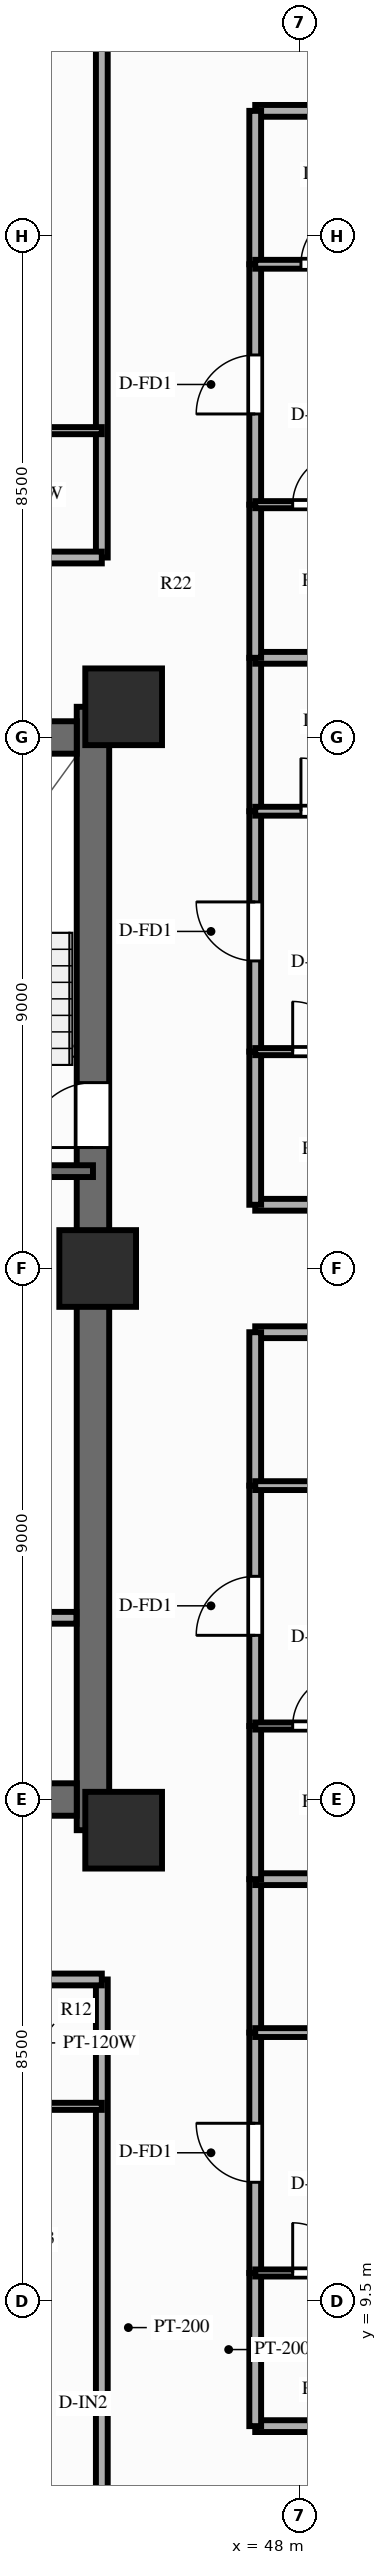
"""IFC4 building model, lengths in metres.
Left out: names, types, materials, properties, quantities, classifications, styles, units other than length and angle.
Written with IfcOpenShell. Run it as: python <this file> out.ifc"""

import sys

from ifc_helpers import new_model, si_unit, direction, frame, frame_2d, origin, origin_2d, place, context, subcontext, project, spatial, rectangle, extrude, source, transform, mapped, element, fill, save


model = new_model("IFC4")
c1 = context("Model", 3, precision=1e-05, world=origin(), true_north=direction((0.0, 1.0)))
c2 = subcontext(c1, "Body", "Model", "MODEL_VIEW")
j1 = project(units=[si_unit("LENGTHUNIT", "METRE"), si_unit("PLANEANGLEUNIT", "RADIAN")], contexts=[c1])
p1 = place(None, origin())
s1 = spatial("IfcSite", under=j1, at=p1, CompositionType="ELEMENT")
p2 = place(p1, origin())
s2 = spatial("IfcBuilding", under=s1, at=p2, CompositionType="ELEMENT")
p3 = place(p2, frame((0.0, 0.0, 104.85)))
s3 = spatial("IfcBuildingStorey", under=s2, at=p3, CompositionType="ELEMENT", Elevation=104.85)
p4 = place(p3, frame((44.5, 17.48, 0.0), z_axis=(0.0, 0.0, 1.0), x_axis=(0.0, 1.0, 0.0)))
e1 = element("IfcWall", 1, at=p4, inside=s3, PredefinedType="SHEAR", context=c2, shape_type="SweptSolid", body=[
    extrude(rectangle(XDim=19.04, YDim=0.55, at=frame_2d((9.52, 0.0))), origin(), (0.0, 0.0, 1.0), 3.0),
])
p5 = place(p4, frame((12.67, 0.0, 0.0), z_axis=(0.0, 0.0, 1.0), x_axis=(-1.0, 0.0, 0.0)))
e2 = element("IfcOpeningElement", 2, at=p5, cuts=e1, PredefinedType="OPENING", context=c2, shape_type="SweptSolid", body=[
    extrude(rectangle(XDim=1.1, YDim=2.15, at=frame_2d((0.55, 1.075))), frame((0.0, 0.287, 0.0), z_axis=(0.0, -1.0, 0.0), x_axis=(1.0, 0.0, 0.0)), (0.0, 0.0, 1.0), 0.574),
])
p6 = place(p3, frame((31.775, 18.0, 0.0), z_axis=(0.0, 0.0, 1.0), x_axis=(1.0, 0.0, 0.0)))
e3 = element("IfcWall", 3, at=p6, inside=s3, PredefinedType="SHEAR", context=c2, shape_type="SweptSolid", body=[
    extrude(rectangle(XDim=12.45, YDim=0.55, at=frame_2d((6.225, 0.0))), origin(), (0.0, 0.0, 1.0), 3.0),
])
p7 = place(p3, frame((31.775, 36.0, 0.0), z_axis=(0.0, 0.0, 1.0), x_axis=(1.0, 0.0, 0.0)))
e4 = element("IfcWall", 4, at=p7, inside=s3, PredefinedType="SHEAR", context=c2, shape_type="SweptSolid", body=[
    extrude(rectangle(XDim=12.45, YDim=0.55, at=frame_2d((6.225, 0.0))), origin(), (0.0, 0.0, 1.0), 3.0),
])
p8 = place(p7, frame((5.175, 0.0, 0.0), z_axis=(0.0, 0.0, 1.0), x_axis=(-1.0, 0.0, 0.0)))
e5 = element("IfcOpeningElement", 5, at=p8, cuts=e4, PredefinedType="OPENING", context=c2, shape_type="SweptSolid", body=[
    extrude(rectangle(XDim=1.4, YDim=2.15, at=frame_2d((0.7, 1.075))), frame((0.0, 0.287, 0.0), z_axis=(0.0, -1.0, 0.0), x_axis=(1.0, 0.0, 0.0)), (0.0, 0.0, 1.0), 0.574),
])
m1 = source(origin(), c2, "Body", "SweptSolid", [
    extrude(rectangle(XDim=1.3, YDim=1.3, at=origin_2d()), origin(), (0.0, 0.0, 1.0), 3.0),
])
for number, where, z_axis, x_axis in (
    (6, (45.02, 17.48, 0.0), (0.0, 0.0, 1.0), (1.0, 0.0, 0.0)),
    (7, (45.02, 36.52, 0.0), (0.0, 0.0, 1.0), (1.0, 0.0, 0.0)),
    (8, (44.58, 27.0, 0.0), (0.0, 0.0, 1.0), (1.0, 0.0, 0.0)),
):
    element("IfcColumn", number, at=place(p3, frame(where, z_axis=z_axis, x_axis=x_axis)), inside=s3, PredefinedType="COLUMN", context=c2, shape_type="MappedRepresentation", body=[
        mapped(m1, transform((0.0, 0.0, 0.0), scale=1.0)),
    ])
p9 = place(p3, frame((42.88, 21.08, 0.0), z_axis=(0.0, 0.0, 1.0), x_axis=(1.0, 0.0, 0.0)))
e9 = element("IfcWall", 9, at=p9, inside=s3, PredefinedType="PARTITIONING", context=c2, shape_type="SweptSolid", body=[
    extrude(rectangle(XDim=1.34, YDim=0.2, at=frame_2d((0.67, 0.0))), origin(), (0.0, 0.0, 1.0), 2.79),
])
p10 = place(p3, frame((40.57, 28.65, 0.0), z_axis=(0.0, 0.0, 1.0), x_axis=(1.0, 0.0, 0.0)))
e10 = element("IfcWall", 10, at=p10, inside=s3, PredefinedType="SOLIDWALL", context=c2, shape_type="SweptSolid", body=[
    extrude(rectangle(XDim=3.93, YDim=0.2, at=frame_2d((1.965, 0.0))), origin(), (0.0, 0.0, 1.0), 2.79),
])
p11 = place(p3, frame((44.65, 14.95, 0.0), z_axis=(0.0, 0.0, 1.0), x_axis=(0.0, -1.0, 0.0)))
e11 = element("IfcWall", 11, at=p11, inside=s3, PredefinedType="PARTITIONING", context=c2, shape_type="SweptSolid", body=[
    extrude(rectangle(XDim=11.8, YDim=0.2, at=frame_2d((5.9, 0.0))), origin(), (0.0, 0.0, 1.0), 2.34),
])
p12 = place(p3, frame((42.5, 14.95, 0.0), z_axis=(0.0, 0.0, 1.0), x_axis=(1.0, 0.0, 0.0)))
e12 = element("IfcWall", 12, at=p12, inside=s3, PredefinedType="PARTITIONING", context=c2, shape_type="SweptSolid", body=[
    extrude(rectangle(XDim=2.15, YDim=0.2, at=frame_2d((1.075, 0.0))), origin(), (0.0, 0.0, 1.0), 2.79),
])
p13 = place(p3, frame((42.5, 12.8, 0.0), z_axis=(0.0, 0.0, 1.0), x_axis=(1.0, 0.0, 0.0)))
e13 = element("IfcWall", 13, at=p13, inside=s3, PredefinedType="PARTITIONING", context=c2, shape_type="SweptSolid", body=[
    extrude(rectangle(XDim=2.15, YDim=0.12, at=frame_2d((1.075, 0.0))), origin(), (0.0, 0.0, 1.0), 2.79),
])
p14 = place(p3, frame((44.65, 39.05, 0.0), z_axis=(0.0, 0.0, 1.0), x_axis=(0.0, 1.0, 0.0)))
e14 = element("IfcWall", 14, at=p14, inside=s3, PredefinedType="PARTITIONING", context=c2, shape_type="SweptSolid", body=[
    extrude(rectangle(XDim=11.8, YDim=0.2, at=frame_2d((5.9, 0.0))), origin(), (0.0, 0.0, 1.0), 2.34),
])
p15 = place(p3, frame((42.085, 39.05, 0.0), z_axis=(0.0, 0.0, 1.0), x_axis=(1.0, 0.0, 0.0)))
e15 = element("IfcWall", 15, at=p15, inside=s3, PredefinedType="PARTITIONING", context=c2, shape_type="SweptSolid", body=[
    extrude(rectangle(XDim=2.564, YDim=0.2, at=frame_2d((1.282, 0.0))), origin(), (0.0, 0.0, 1.0), 2.79),
])
p16 = place(p3, frame((42.085, 41.2, 0.0), z_axis=(0.0, 0.0, 1.0), x_axis=(1.0, 0.0, 0.0)))
e16 = element("IfcWall", 16, at=p16, inside=s3, PredefinedType="PARTITIONING", context=c2, shape_type="SweptSolid", body=[
    extrude(rectangle(XDim=2.564, YDim=0.12, at=frame_2d((1.282, 0.0))), origin(), (0.0, 0.0, 1.0), 2.79),
])
for number, where, z_axis, x_axis in (
    (17, (47.25, 7.38, 0.0), (0.0, 0.0, 1.0), (1.0, 0.0, 0.0)),
    (18, (47.25, 25.92, 0.0), (0.0, 0.0, 1.0), (1.0, 0.0, 0.0)),
):
    element("IfcWall", number, at=place(p3, frame(where, z_axis=z_axis, x_axis=x_axis)), inside=s3, PredefinedType="PARTITIONING", context=c2, shape_type="SweptSolid", body=[
        extrude(rectangle(XDim=16.6, YDim=0.2, at=frame_2d((8.3, 0.0))), origin(), (0.0, 0.0, 1.0), 2.79),
    ])
p17 = place(p3, frame((47.25, 7.38, 0.0), z_axis=(0.0, 0.0, 1.0), x_axis=(0.0, 1.0, 0.0)))
e19 = element("IfcWall", 19, at=p17, inside=s3, PredefinedType="PARTITIONING", context=c2, shape_type="SweptSolid", body=[
    extrude(rectangle(XDim=2.596, YDim=0.2, at=frame_2d((1.298, 0.0))), origin(), (0.0, 0.0, 1.0), 2.79),
])
p18 = place(p3, frame((47.25, 9.976, 0.0), z_axis=(0.0, 0.0, 1.0), x_axis=(0.0, 1.0, 0.0)))
e20 = element("IfcWall", 20, at=p18, inside=s3, PredefinedType="PARTITIONING", context=c2, shape_type="SweptSolid", body=[
    extrude(rectangle(XDim=4.074, YDim=0.2, at=frame_2d((2.037, 0.0))), origin(), (0.0, 0.0, 1.0), 2.79),
])
p19 = place(p18, frame((1.537, 0.0, 0.0)))
e21 = element("IfcOpeningElement", 21, at=p19, cuts=e20, PredefinedType="OPENING", context=c2, shape_type="SweptSolid", body=[
    extrude(rectangle(XDim=1.0, YDim=2.15, at=frame_2d((0.5, 1.075))), frame((0.0, 0.112, 0.0), z_axis=(0.0, -1.0, 0.0), x_axis=(1.0, 0.0, 0.0)), (0.0, 0.0, 1.0), 0.224),
])
p20 = place(p3, frame((47.25, 14.05, 0.0), z_axis=(0.0, 0.0, 1.0), x_axis=(0.0, 1.0, 0.0)))
e22 = element("IfcWall", 22, at=p20, inside=s3, PredefinedType="PARTITIONING", context=c2, shape_type="SweptSolid", body=[
    extrude(rectangle(XDim=2.6, YDim=0.2, at=frame_2d((1.3, 0.0))), origin(), (0.0, 0.0, 1.0), 2.79),
])
p21 = place(p3, frame((47.25, 9.976, 0.0), z_axis=(0.0, 0.0, 1.0), x_axis=(1.0, 0.0, 0.0)))
e23 = element("IfcWall", 23, at=p21, inside=s3, PredefinedType="PARTITIONING", context=c2, shape_type="SweptSolid", body=[
    extrude(rectangle(XDim=2.12, YDim=0.12, at=frame_2d((1.06, 0.0))), origin(), (0.0, 0.0, 1.0), 2.79),
])
p22 = place(p21, frame((0.635, 0.0, 0.0)))
e24 = element("IfcOpeningElement", 24, at=p22, cuts=e23, PredefinedType="OPENING", context=c2, shape_type="SweptSolid", body=[
    extrude(rectangle(XDim=0.85, YDim=2.05, at=frame_2d((0.425, 1.025))), frame((0.0, 0.072, 0.0), z_axis=(0.0, -1.0, 0.0), x_axis=(1.0, 0.0, 0.0)), (0.0, 0.0, 1.0), 0.144),
])
p23 = place(p3, frame((47.25, 14.05, 0.0), z_axis=(0.0, 0.0, 1.0), x_axis=(1.0, 0.0, 0.0)))
e25 = element("IfcWall", 25, at=p23, inside=s3, PredefinedType="PARTITIONING", context=c2, shape_type="SweptSolid", body=[
    extrude(rectangle(XDim=2.93, YDim=0.15, at=frame_2d((1.465, 0.0))), origin(), (0.0, 0.0, 1.0), 2.79),
])
p24 = place(p23, frame((1.015, 0.0, 0.0)))
e26 = element("IfcOpeningElement", 26, at=p24, cuts=e25, PredefinedType="OPENING", context=c2, shape_type="SweptSolid", body=[
    extrude(rectangle(XDim=0.9, YDim=2.1, at=frame_2d((0.45, 1.05))), frame((0.0, 0.087, 0.0), z_axis=(0.0, -1.0, 0.0), x_axis=(1.0, 0.0, 0.0)), (0.0, 0.0, 1.0), 0.174),
])
p25 = place(p3, frame((47.25, 16.65, 0.0), z_axis=(0.0, 0.0, 1.0), x_axis=(1.0, 0.0, 0.0)))
e27 = element("IfcWall", 27, at=p25, inside=s3, PredefinedType="PARTITIONING", context=c2, shape_type="SweptSolid", body=[
    extrude(rectangle(XDim=16.6, YDim=0.2, at=frame_2d((8.3, 0.0))), origin(), (0.0, 0.0, 1.0), 2.79),
])
p26 = place(p3, frame((47.25, 16.65, 0.0), z_axis=(0.0, 0.0, 1.0), x_axis=(0.0, 1.0, 0.0)))
e28 = element("IfcWall", 28, at=p26, inside=s3, PredefinedType="PARTITIONING", context=c2, shape_type="SweptSolid", body=[
    extrude(rectangle(XDim=2.596, YDim=0.2, at=frame_2d((1.298, 0.0))), origin(), (0.0, 0.0, 1.0), 2.79),
])
p27 = place(p3, frame((47.25, 19.246, 0.0), z_axis=(0.0, 0.0, 1.0), x_axis=(0.0, 1.0, 0.0)))
e29 = element("IfcWall", 29, at=p27, inside=s3, PredefinedType="PARTITIONING", context=c2, shape_type="SweptSolid", body=[
    extrude(rectangle(XDim=4.074, YDim=0.2, at=frame_2d((2.037, 0.0))), origin(), (0.0, 0.0, 1.0), 2.79),
])
p28 = place(p27, frame((1.537, 0.0, 0.0)))
e30 = element("IfcOpeningElement", 30, at=p28, cuts=e29, PredefinedType="OPENING", context=c2, shape_type="SweptSolid", body=[
    extrude(rectangle(XDim=1.0, YDim=2.15, at=frame_2d((0.5, 1.075))), frame((0.0, 0.112, 0.0), z_axis=(0.0, -1.0, 0.0), x_axis=(1.0, 0.0, 0.0)), (0.0, 0.0, 1.0), 0.224),
])
p29 = place(p3, frame((47.25, 23.32, 0.0), z_axis=(0.0, 0.0, 1.0), x_axis=(0.0, 1.0, 0.0)))
e31 = element("IfcWall", 31, at=p29, inside=s3, PredefinedType="PARTITIONING", context=c2, shape_type="SweptSolid", body=[
    extrude(rectangle(XDim=2.6, YDim=0.2, at=frame_2d((1.3, 0.0))), origin(), (0.0, 0.0, 1.0), 2.79),
])
p30 = place(p3, frame((47.25, 19.246, 0.0), z_axis=(0.0, 0.0, 1.0), x_axis=(1.0, 0.0, 0.0)))
e32 = element("IfcWall", 32, at=p30, inside=s3, PredefinedType="PARTITIONING", context=c2, shape_type="SweptSolid", body=[
    extrude(rectangle(XDim=2.12, YDim=0.12, at=frame_2d((1.06, 0.0))), origin(), (0.0, 0.0, 1.0), 2.79),
])
p31 = place(p30, frame((0.635, 0.0, 0.0)))
e33 = element("IfcOpeningElement", 33, at=p31, cuts=e32, PredefinedType="OPENING", context=c2, shape_type="SweptSolid", body=[
    extrude(rectangle(XDim=0.85, YDim=2.05, at=frame_2d((0.425, 1.025))), frame((0.0, 0.072, 0.0), z_axis=(0.0, -1.0, 0.0), x_axis=(1.0, 0.0, 0.0)), (0.0, 0.0, 1.0), 0.144),
])
p32 = place(p3, frame((47.25, 23.32, 0.0), z_axis=(0.0, 0.0, 1.0), x_axis=(1.0, 0.0, 0.0)))
e34 = element("IfcWall", 34, at=p32, inside=s3, PredefinedType="PARTITIONING", context=c2, shape_type="SweptSolid", body=[
    extrude(rectangle(XDim=2.93, YDim=0.15, at=frame_2d((1.465, 0.0))), origin(), (0.0, 0.0, 1.0), 2.79),
])
p33 = place(p32, frame((1.015, 0.0, 0.0)))
e35 = element("IfcOpeningElement", 35, at=p33, cuts=e34, PredefinedType="OPENING", context=c2, shape_type="SweptSolid", body=[
    extrude(rectangle(XDim=0.9, YDim=2.1, at=frame_2d((0.45, 1.05))), frame((0.0, 0.087, 0.0), z_axis=(0.0, -1.0, 0.0), x_axis=(1.0, 0.0, 0.0)), (0.0, 0.0, 1.0), 0.174),
])
for number, where, z_axis, x_axis in (
    (36, (47.25, 28.08, 0.0), (0.0, 0.0, 1.0), (1.0, 0.0, 0.0)),
    (37, (47.25, 46.62, 0.0), (0.0, 0.0, 1.0), (1.0, 0.0, 0.0)),
):
    element("IfcWall", number, at=place(p3, frame(where, z_axis=z_axis, x_axis=x_axis)), inside=s3, PredefinedType="PARTITIONING", context=c2, shape_type="SweptSolid", body=[
        extrude(rectangle(XDim=16.6, YDim=0.2, at=frame_2d((8.3, 0.0))), origin(), (0.0, 0.0, 1.0), 2.79),
    ])
p34 = place(p3, frame((47.25, 28.08, 0.0), z_axis=(0.0, 0.0, 1.0), x_axis=(0.0, 1.0, 0.0)))
e38 = element("IfcWall", 38, at=p34, inside=s3, PredefinedType="PARTITIONING", context=c2, shape_type="SweptSolid", body=[
    extrude(rectangle(XDim=2.595, YDim=0.2, at=frame_2d((1.298, 0.0))), origin(), (0.0, 0.0, 1.0), 2.79),
])
p35 = place(p3, frame((47.25, 30.676, 0.0), z_axis=(0.0, 0.0, 1.0), x_axis=(0.0, 1.0, 0.0)))
e39 = element("IfcWall", 39, at=p35, inside=s3, PredefinedType="PARTITIONING", context=c2, shape_type="SweptSolid", body=[
    extrude(rectangle(XDim=4.074, YDim=0.2, at=frame_2d((2.037, 0.0))), origin(), (0.0, 0.0, 1.0), 2.79),
])
p36 = place(p35, frame((1.537, 0.0, 0.0)))
e40 = element("IfcOpeningElement", 40, at=p36, cuts=e39, PredefinedType="OPENING", context=c2, shape_type="SweptSolid", body=[
    extrude(rectangle(XDim=1.0, YDim=2.15, at=frame_2d((0.5, 1.075))), frame((0.0, 0.112, 0.0), z_axis=(0.0, -1.0, 0.0), x_axis=(1.0, 0.0, 0.0)), (0.0, 0.0, 1.0), 0.224),
])
p37 = place(p3, frame((47.25, 34.75, 0.0), z_axis=(0.0, 0.0, 1.0), x_axis=(0.0, 1.0, 0.0)))
e41 = element("IfcWall", 41, at=p37, inside=s3, PredefinedType="PARTITIONING", context=c2, shape_type="SweptSolid", body=[
    extrude(rectangle(XDim=2.6, YDim=0.2, at=frame_2d((1.3, 0.0))), origin(), (0.0, 0.0, 1.0), 2.79),
])
p38 = place(p3, frame((47.25, 30.676, 0.0), z_axis=(0.0, 0.0, 1.0), x_axis=(1.0, 0.0, 0.0)))
e42 = element("IfcWall", 42, at=p38, inside=s3, PredefinedType="PARTITIONING", context=c2, shape_type="SweptSolid", body=[
    extrude(rectangle(XDim=2.12, YDim=0.12, at=frame_2d((1.06, 0.0))), origin(), (0.0, 0.0, 1.0), 2.79),
])
p39 = place(p38, frame((0.635, 0.0, 0.0)))
e43 = element("IfcOpeningElement", 43, at=p39, cuts=e42, PredefinedType="OPENING", context=c2, shape_type="SweptSolid", body=[
    extrude(rectangle(XDim=0.85, YDim=2.05, at=frame_2d((0.425, 1.025))), frame((0.0, 0.072, 0.0), z_axis=(0.0, -1.0, 0.0), x_axis=(1.0, 0.0, 0.0)), (0.0, 0.0, 1.0), 0.144),
])
p40 = place(p3, frame((47.25, 34.75, 0.0), z_axis=(0.0, 0.0, 1.0), x_axis=(1.0, 0.0, 0.0)))
e44 = element("IfcWall", 44, at=p40, inside=s3, PredefinedType="PARTITIONING", context=c2, shape_type="SweptSolid", body=[
    extrude(rectangle(XDim=2.45, YDim=0.15, at=frame_2d((1.225, 0.0))), origin(), (0.0, 0.0, 1.0), 2.79),
])
p41 = place(p40, frame((0.775, 0.0, 0.0)))
e45 = element("IfcOpeningElement", 45, at=p41, cuts=e44, PredefinedType="OPENING", context=c2, shape_type="SweptSolid", body=[
    extrude(rectangle(XDim=0.9, YDim=2.1, at=frame_2d((0.45, 1.05))), frame((0.0, 0.087, 0.0), z_axis=(0.0, -1.0, 0.0), x_axis=(1.0, 0.0, 0.0)), (0.0, 0.0, 1.0), 0.174),
])
p42 = place(p3, frame((47.25, 37.35, 0.0), z_axis=(0.0, 0.0, 1.0), x_axis=(1.0, 0.0, 0.0)))
e46 = element("IfcWall", 46, at=p42, inside=s3, PredefinedType="PARTITIONING", context=c2, shape_type="SweptSolid", body=[
    extrude(rectangle(XDim=16.6, YDim=0.2, at=frame_2d((8.3, 0.0))), origin(), (0.0, 0.0, 1.0), 2.79),
])
p43 = place(p3, frame((47.25, 37.35, 0.0), z_axis=(0.0, 0.0, 1.0), x_axis=(0.0, 1.0, 0.0)))
e47 = element("IfcWall", 47, at=p43, inside=s3, PredefinedType="PARTITIONING", context=c2, shape_type="SweptSolid", body=[
    extrude(rectangle(XDim=2.595, YDim=0.2, at=frame_2d((1.298, 0.0))), origin(), (0.0, 0.0, 1.0), 2.79),
])
p44 = place(p3, frame((47.25, 39.946, 0.0), z_axis=(0.0, 0.0, 1.0), x_axis=(0.0, 1.0, 0.0)))
e48 = element("IfcWall", 48, at=p44, inside=s3, PredefinedType="PARTITIONING", context=c2, shape_type="SweptSolid", body=[
    extrude(rectangle(XDim=4.074, YDim=0.2, at=frame_2d((2.037, 0.0))), origin(), (0.0, 0.0, 1.0), 2.79),
])
p45 = place(p44, frame((1.537, 0.0, 0.0)))
e49 = element("IfcOpeningElement", 49, at=p45, cuts=e48, PredefinedType="OPENING", context=c2, shape_type="SweptSolid", body=[
    extrude(rectangle(XDim=1.0, YDim=2.15, at=frame_2d((0.5, 1.075))), frame((0.0, 0.112, 0.0), z_axis=(0.0, -1.0, 0.0), x_axis=(1.0, 0.0, 0.0)), (0.0, 0.0, 1.0), 0.224),
])
p46 = place(p3, frame((47.25, 44.02, 0.0), z_axis=(0.0, 0.0, 1.0), x_axis=(0.0, 1.0, 0.0)))
e50 = element("IfcWall", 50, at=p46, inside=s3, PredefinedType="PARTITIONING", context=c2, shape_type="SweptSolid", body=[
    extrude(rectangle(XDim=2.6, YDim=0.2, at=frame_2d((1.3, 0.0))), origin(), (0.0, 0.0, 1.0), 2.79),
])
p47 = place(p3, frame((47.25, 39.946, 0.0), z_axis=(0.0, 0.0, 1.0), x_axis=(1.0, 0.0, 0.0)))
e51 = element("IfcWall", 51, at=p47, inside=s3, PredefinedType="PARTITIONING", context=c2, shape_type="SweptSolid", body=[
    extrude(rectangle(XDim=2.12, YDim=0.12, at=frame_2d((1.06, 0.0))), origin(), (0.0, 0.0, 1.0), 2.79),
])
p48 = place(p47, frame((0.635, 0.0, 0.0)))
e52 = element("IfcOpeningElement", 52, at=p48, cuts=e51, PredefinedType="OPENING", context=c2, shape_type="SweptSolid", body=[
    extrude(rectangle(XDim=0.85, YDim=2.05, at=frame_2d((0.425, 1.025))), frame((0.0, 0.072, 0.0), z_axis=(0.0, -1.0, 0.0), x_axis=(1.0, 0.0, 0.0)), (0.0, 0.0, 1.0), 0.144),
])
p49 = place(p3, frame((47.25, 44.02, 0.0), z_axis=(0.0, 0.0, 1.0), x_axis=(1.0, 0.0, 0.0)))
e53 = element("IfcWall", 53, at=p49, inside=s3, PredefinedType="PARTITIONING", context=c2, shape_type="SweptSolid", body=[
    extrude(rectangle(XDim=2.45, YDim=0.15, at=frame_2d((1.225, 0.0))), origin(), (0.0, 0.0, 1.0), 2.79),
])
p50 = place(p49, frame((0.775, 0.0, 0.0)))
e54 = element("IfcOpeningElement", 54, at=p50, cuts=e53, PredefinedType="OPENING", context=c2, shape_type="SweptSolid", body=[
    extrude(rectangle(XDim=0.9, YDim=2.1, at=frame_2d((0.45, 1.05))), frame((0.0, 0.087, 0.0), z_axis=(0.0, -1.0, 0.0), x_axis=(1.0, 0.0, 0.0)), (0.0, 0.0, 1.0), 0.174),
])
m2 = source(origin(), c2, "Body", "SweptSolid", [
    extrude(rectangle(XDim=1.1, YDim=2.15, at=frame_2d((0.55, 1.075))), frame((0.0, 0.025, 0.0), z_axis=(0.0, -1.0, 0.0), x_axis=(1.0, 0.0, 0.0)), (0.0, 0.0, 1.0), 0.05),
])
p51 = place(p5, origin())
e55 = element("IfcDoor", 55, at=p51, inside=s3, OperationType="SINGLE_SWING_RIGHT", PredefinedType="DOOR", context=c2, shape_type="MappedRepresentation", body=[
    mapped(m2, transform((0.0, 0.0, 0.0), scale=1.0)),
])
fill(e2, e55)
m3 = source(origin(), c2, "Body", "SweptSolid", [
    extrude(rectangle(XDim=1.0, YDim=2.15, at=frame_2d((0.5, 1.075))), frame((0.0, 0.025, 0.0), z_axis=(0.0, -1.0, 0.0), x_axis=(1.0, 0.0, 0.0)), (0.0, 0.0, 1.0), 0.05),
])
p52 = place(p19, origin())
e56 = element("IfcDoor", 56, at=p52, inside=s3, OperationType="SINGLE_SWING_RIGHT", PredefinedType="DOOR", context=c2, shape_type="MappedRepresentation", body=[
    mapped(m3, transform((0.0, 0.0, 0.0), scale=1.0)),
])
fill(e21, e56)
m4 = source(origin(), c2, "Body", "SweptSolid", [
    extrude(rectangle(XDim=0.85, YDim=2.05, at=frame_2d((0.425, 1.025))), frame((0.0, 0.025, 0.0), z_axis=(0.0, -1.0, 0.0), x_axis=(1.0, 0.0, 0.0)), (0.0, 0.0, 1.0), 0.05),
])
p53 = place(p22, origin())
e57 = element("IfcDoor", 57, at=p53, inside=s3, OperationType="SINGLE_SWING_LEFT", PredefinedType="DOOR", context=c2, shape_type="MappedRepresentation", body=[
    mapped(m4, transform((0.0, 0.0, 0.0), scale=1.0)),
])
fill(e24, e57)
p54 = place(p28, origin())
e58 = element("IfcDoor", 58, at=p54, inside=s3, OperationType="SINGLE_SWING_LEFT", PredefinedType="DOOR", context=c2, shape_type="MappedRepresentation", body=[
    mapped(m3, transform((0.0, 0.0, 0.0), scale=1.0)),
])
fill(e30, e58)
p55 = place(p31, origin())
e59 = element("IfcDoor", 59, at=p55, inside=s3, OperationType="SINGLE_SWING_RIGHT", PredefinedType="DOOR", context=c2, shape_type="MappedRepresentation", body=[
    mapped(m4, transform((0.0, 0.0, 0.0), scale=1.0)),
])
fill(e33, e59)
p56 = place(p36, origin())
e60 = element("IfcDoor", 60, at=p56, inside=s3, OperationType="SINGLE_SWING_RIGHT", PredefinedType="DOOR", context=c2, shape_type="MappedRepresentation", body=[
    mapped(m3, transform((0.0, 0.0, 0.0), scale=1.0)),
])
fill(e40, e60)
p57 = place(p39, origin())
e61 = element("IfcDoor", 61, at=p57, inside=s3, OperationType="SINGLE_SWING_LEFT", PredefinedType="DOOR", context=c2, shape_type="MappedRepresentation", body=[
    mapped(m4, transform((0.0, 0.0, 0.0), scale=1.0)),
])
fill(e43, e61)
m5 = source(origin(), c2, "Body", "SweptSolid", [
    extrude(rectangle(XDim=0.9, YDim=2.1, at=frame_2d((0.45, 1.05))), frame((0.0, 0.025, 0.0), z_axis=(0.0, -1.0, 0.0), x_axis=(1.0, 0.0, 0.0)), (0.0, 0.0, 1.0), 0.05),
])
p58 = place(p41, origin())
e62 = element("IfcDoor", 62, at=p58, inside=s3, OperationType="SINGLE_SWING_LEFT", PredefinedType="DOOR", context=c2, shape_type="MappedRepresentation", body=[
    mapped(m5, transform((0.0, 0.0, 0.0), scale=1.0)),
])
fill(e45, e62)
p59 = place(p45, origin())
e63 = element("IfcDoor", 63, at=p59, inside=s3, OperationType="SINGLE_SWING_LEFT", PredefinedType="DOOR", context=c2, shape_type="MappedRepresentation", body=[
    mapped(m3, transform((0.0, 0.0, 0.0), scale=1.0)),
])
fill(e49, e63)
p60 = place(p48, origin())
e64 = element("IfcDoor", 64, at=p60, inside=s3, OperationType="SINGLE_SWING_RIGHT", PredefinedType="DOOR", context=c2, shape_type="MappedRepresentation", body=[
    mapped(m4, transform((0.0, 0.0, 0.0), scale=1.0)),
])
fill(e52, e64)
p61 = place(p50, origin())
e65 = element("IfcDoor", 65, at=p61, inside=s3, OperationType="SINGLE_SWING_RIGHT", PredefinedType="DOOR", context=c2, shape_type="MappedRepresentation", body=[
    mapped(m5, transform((0.0, 0.0, 0.0), scale=1.0)),
])
fill(e54, e65)
save(model, sys.argv[1])
